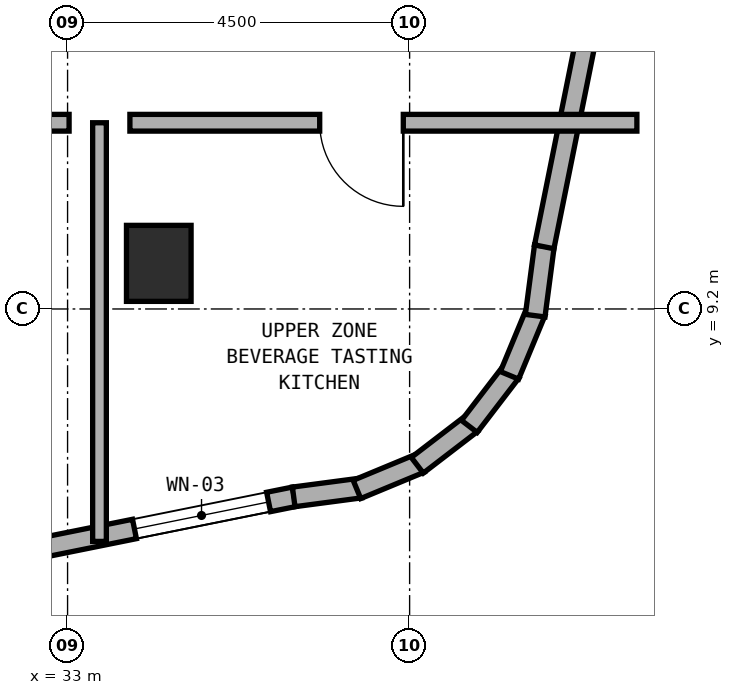
"""IFC4 building model, lengths in metres.
Left out: names, types, materials, properties, quantities, classifications, styles, units other than length and angle.
Written with IfcOpenShell. Run it as: python <this file> out.ifc"""

import sys

from ifc_helpers import new_model, si_unit, direction, frame, frame_2d, origin, origin_2d, place, context, subcontext, project, spatial, rectangle, extrude, element, fill, save


model = new_model("IFC4")
c1 = context("Model", 3, precision=1e-05, world=origin(), true_north=direction((0.0, 1.0)))
c2 = subcontext(c1, "Body", "Model", "MODEL_VIEW")
j1 = project(units=[si_unit("LENGTHUNIT", "METRE"), si_unit("PLANEANGLEUNIT", "RADIAN")], contexts=[c1])
p1 = place(None, origin())
s1 = spatial("IfcSite", under=j1, at=p1, CompositionType="ELEMENT")
p2 = place(p1, origin())
s2 = spatial("IfcBuilding", under=s1, at=p2, CompositionType="ELEMENT")
p3 = place(p2, frame((0.0, 0.0, 166.0)))
s3 = spatial("IfcBuildingStorey", under=s2, at=p3, CompositionType="ELEMENT", Elevation=166.0)
p4 = place(p3, frame((34.2, 9.8, 0.0), z_axis=(0.0, 0.0, 1.0), x_axis=(1.0, 0.0, 0.0)))
e1 = element("IfcColumn", 1, at=p4, inside=s3, PredefinedType="COLUMN", context=c2, shape_type="SweptSolid", body=[
    extrude(rectangle(XDim=0.85, YDim=1.0, at=origin_2d()), origin(), (0.0, 0.0, 1.0), 3.5),
])
p5 = place(p3, frame((27.009, 4.922, 0.0), z_axis=(0.0, 0.0, 1.0), x_axis=(0.980321298532, 0.197408590603, 0.0)))
e2 = element("IfcWall", 2, at=p5, inside=s3, PredefinedType="STANDARD", context=c2, shape_type="SweptSolid", body=[
    extrude(rectangle(XDim=9.153, YDim=0.26, at=frame_2d((4.577, 0.0))), origin(), (0.0, 0.0, 1.0), 3.22),
])
p6 = place(p5, frame((2.183, 0.0, 0.85)))
e3 = element("IfcOpeningElement", 3, at=p6, cuts=e2, PredefinedType="OPENING", context=c2, shape_type="SweptSolid", body=[
    extrude(rectangle(XDim=2.1, YDim=1.5, at=frame_2d((1.05, 0.75))), frame((0.0, 0.14, 0.0), z_axis=(0.0, -1.0, 0.0), x_axis=(1.0, 0.0, 0.0)), (0.0, 0.0, 1.0), 0.28),
])
p7 = place(p5, frame((7.009, 0.0, 0.85)))
e4 = element("IfcOpeningElement", 4, at=p7, cuts=e2, PredefinedType="OPENING", context=c2, shape_type="SweptSolid", body=[
    extrude(rectangle(XDim=1.8, YDim=1.5, at=frame_2d((0.9, 0.75))), frame((0.0, 0.14, 0.0), z_axis=(0.0, -1.0, 0.0), x_axis=(1.0, 0.0, 0.0)), (0.0, 0.0, 1.0), 0.28),
])
p8 = place(p3, frame((35.975, 6.728, 0.0), z_axis=(0.0, 0.0, 1.0), x_axis=(0.991388484223, 0.130953706898, 0.0)))
e5 = element("IfcWall", 5, at=p8, inside=s3, PredefinedType="STANDARD", context=c2, shape_type="SweptSolid", body=[
    extrude(rectangle(XDim=0.885, YDim=0.26, at=frame_2d((0.443, 0.0))), origin(), (0.0, 0.0, 1.0), 3.22),
])
p9 = place(p3, frame((36.807, 6.826, 0.0), z_axis=(0.0, 0.0, 1.0), x_axis=(0.923627776508, 0.383290660547, 0.0)))
e6 = element("IfcWall", 6, at=p9, inside=s3, PredefinedType="STANDARD", context=c2, shape_type="SweptSolid", body=[
    extrude(rectangle(XDim=0.903, YDim=0.26, at=frame_2d((0.452, 0.0))), origin(), (0.0, 0.0, 1.0), 3.22),
])
p10 = place(p3, frame((37.601, 7.144, 0.0), z_axis=(0.0, 0.0, 1.0), x_axis=(0.793458244748, 0.608624690463, 0.0)))
e7 = element("IfcWall", 7, at=p10, inside=s3, PredefinedType="STANDARD", context=c2, shape_type="SweptSolid", body=[
    extrude(rectangle(XDim=0.902, YDim=0.26, at=frame_2d((0.451, 0.0))), origin(), (0.0, 0.0, 1.0), 3.22),
])
p11 = place(p3, frame((38.286, 7.655, 0.0), z_axis=(0.0, 0.0, 1.0), x_axis=(0.608494022858, 0.793558456666, 0.0)))
e8 = element("IfcWall", 8, at=p11, inside=s3, PredefinedType="STANDARD", context=c2, shape_type="SweptSolid", body=[
    extrude(rectangle(XDim=0.902, YDim=0.26, at=frame_2d((0.451, 0.0))), origin(), (0.0, 0.0, 1.0), 3.22),
])
p12 = place(p3, frame((38.814, 8.327, 0.0), z_axis=(0.0, 0.0, 1.0), x_axis=(0.383155708213, 0.923683767999, 0.0)))
e9 = element("IfcWall", 9, at=p12, inside=s3, PredefinedType="STANDARD", context=c2, shape_type="SweptSolid", body=[
    extrude(rectangle(XDim=0.903, YDim=0.26, at=frame_2d((0.451, 0.0))), origin(), (0.0, 0.0, 1.0), 3.22),
])
p13 = place(p3, frame((39.152, 9.112, 0.0), z_axis=(0.0, 0.0, 1.0), x_axis=(0.130200706103, 0.991487658083, 0.0)))
e10 = element("IfcWall", 10, at=p13, inside=s3, PredefinedType="STANDARD", context=c2, shape_type="SweptSolid", body=[
    extrude(rectangle(XDim=0.921, YDim=0.26, at=frame_2d((0.46, 0.0))), origin(), (0.0, 0.0, 1.0), 3.22),
])
p14 = place(p3, frame((39.271, 10.018, 0.0), z_axis=(0.0, 0.0, 1.0), x_axis=(0.197435082048, 0.980315963543, 0.0)))
e11 = element("IfcWall", 11, at=p14, inside=s3, PredefinedType="STANDARD", context=c2, shape_type="SweptSolid", body=[
    extrude(rectangle(XDim=9.183, YDim=0.26, at=frame_2d((4.591, 0.0))), origin(), (0.0, 0.0, 1.0), 3.22),
])
p15 = place(p14, frame((5.349, 0.0, 0.85)))
e12 = element("IfcOpeningElement", 12, at=p15, cuts=e11, PredefinedType="OPENING", context=c2, shape_type="SweptSolid", body=[
    extrude(rectangle(XDim=2.1, YDim=1.5, at=frame_2d((1.05, 0.75))), frame((0.0, 0.14, 0.0), z_axis=(0.0, -1.0, 0.0), x_axis=(1.0, 0.0, 0.0)), (0.0, 0.0, 1.0), 0.28),
])
p16 = place(p3, frame((33.42, 6.142, 0.0), z_axis=(0.0, 0.0, 1.0), x_axis=(0.0, 1.0, 0.0)))
e13 = element("IfcWall", 13, at=p16, inside=s3, PredefinedType="SOLIDWALL", context=c2, shape_type="SweptSolid", body=[
    extrude(rectangle(XDim=5.508, YDim=0.18, at=frame_2d((2.754, 0.0))), origin(), (0.0, 0.0, 1.0), 2.835),
])
p17 = place(p3, frame((26.35, 11.65, 0.0), z_axis=(0.0, 0.0, 1.0), x_axis=(1.0, 0.0, 0.0)))
e14 = element("IfcWall", 14, at=p17, inside=s3, PredefinedType="SOLIDWALL", context=c2, shape_type="SweptSolid", body=[
    extrude(rectangle(XDim=6.67, YDim=0.22, at=frame_2d((3.335, 0.0))), origin(), (0.0, 0.0, 1.0), 2.795),
])
p18 = place(p17, frame((2.496, 0.0, 0.0)))
e15 = element("IfcOpeningElement", 15, at=p18, cuts=e14, PredefinedType="OPENING", context=c2, shape_type="SweptSolid", body=[
    extrude(rectangle(XDim=1.1, YDim=2.1, at=frame_2d((0.55, 1.05))), frame((0.0, 0.12, 0.0), z_axis=(0.0, -1.0, 0.0), x_axis=(1.0, 0.0, 0.0)), (0.0, 0.0, 1.0), 0.24),
])
p19 = place(p3, frame((33.82, 11.65, 0.0), z_axis=(0.0, 0.0, 1.0), x_axis=(1.0, 0.0, 0.0)))
e16 = element("IfcWall", 16, at=p19, inside=s3, PredefinedType="SOLIDWALL", context=c2, shape_type="SweptSolid", body=[
    extrude(rectangle(XDim=6.67, YDim=0.22, at=frame_2d((3.335, 0.0))), origin(), (0.0, 0.0, 1.0), 2.795),
])
p20 = place(p19, frame((2.497, 0.0, 0.0)))
e17 = element("IfcOpeningElement", 17, at=p20, cuts=e16, PredefinedType="OPENING", context=c2, shape_type="SweptSolid", body=[
    extrude(rectangle(XDim=1.1, YDim=2.1, at=frame_2d((0.55, 1.05))), frame((0.0, 0.12, 0.0), z_axis=(0.0, -1.0, 0.0), x_axis=(1.0, 0.0, 0.0)), (0.0, 0.0, 1.0), 0.24),
])
p21 = place(p7, origin())
e18 = element("IfcWindow", 18, at=p21, inside=s3, PartitioningType="SINGLE_PANEL", PredefinedType="WINDOW", context=c2, shape_type="SweptSolid", body=[
    extrude(rectangle(XDim=1.8, YDim=1.5, at=frame_2d((0.9, 0.75))), frame((0.0, 0.03, 0.0), z_axis=(0.0, -1.0, 0.0), x_axis=(1.0, 0.0, 0.0)), (0.0, 0.0, 1.0), 0.06),
])
fill(e4, e18)
p22 = place(p20, frame((1.1, 0.0, 0.0), z_axis=(0.0, 0.0, 1.0), x_axis=(-1.0, 0.0, 0.0)))
e19 = element("IfcDoor", 19, at=p22, inside=s3, OperationType="SINGLE_SWING_LEFT", PredefinedType="DOOR", context=c2, shape_type="SweptSolid", body=[
    extrude(rectangle(XDim=1.1, YDim=2.1, at=frame_2d((0.55, 1.05))), frame((0.0, 0.025, 0.0), z_axis=(0.0, -1.0, 0.0), x_axis=(1.0, 0.0, 0.0)), (0.0, 0.0, 1.0), 0.05),
])
fill(e17, e19)
save(model, sys.argv[1])
